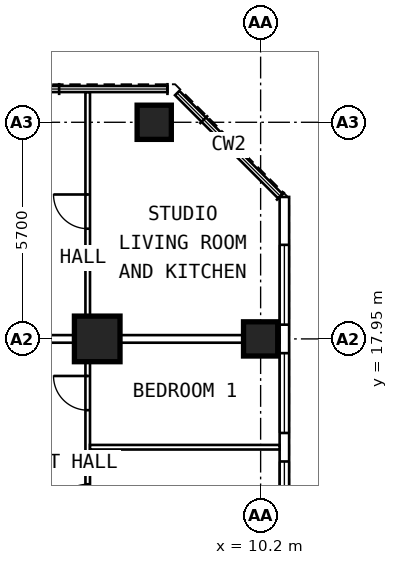
"""IFC4 building model, lengths in metres.
Left out: names, types, materials, properties, quantities, classifications, styles, units other than length and angle.
Written with IfcOpenShell. Run it as: python <this file> out.ifc"""

import sys

from ifc_helpers import new_model, si_unit, direction, frame, frame_2d, origin, origin_2d, place, context, subcontext, project, spatial, rectangle, extrude, element, fill, save


model = new_model("IFC4")
c1 = context("Model", 3, precision=1e-05, world=origin(), true_north=direction((0.0, 1.0)))
c2 = subcontext(c1, "Body", "Model", "MODEL_VIEW")
j1 = project(units=[si_unit("LENGTHUNIT", "METRE"), si_unit("PLANEANGLEUNIT", "RADIAN")], contexts=[c1])
p1 = place(None, origin())
s1 = spatial("IfcSite", under=j1, at=p1, CompositionType="ELEMENT")
p2 = place(p1, origin())
s2 = spatial("IfcBuilding", under=s1, at=p2, CompositionType="ELEMENT")
p3 = place(p2, frame((0.0, 0.0, 165.2)))
s3 = spatial("IfcBuildingStorey", under=s2, at=p3, CompositionType="ELEMENT", Elevation=165.2)
for number, where, z_axis, x_axis in (
    (1, (10.2, 17.95, 0.0), (0.0, 0.0, 1.0), (0.0, 1.0, 0.0)),
    (2, (7.4, 23.65, 0.0), (0.0, 0.0, 1.0), (0.0, 1.0, 0.0)),
):
    element("IfcColumn", number, at=place(p3, frame(where, z_axis=z_axis, x_axis=x_axis)), inside=s3, PredefinedType="COLUMN", context=c2, shape_type="SweptSolid", body=[
        extrude(rectangle(XDim=0.9, YDim=0.9, at=origin_2d()), origin(), (0.0, 0.0, 1.0), 3.6),
    ])
p4 = place(p3, frame((5.9, 17.95, 0.0), z_axis=(0.0, 0.0, 1.0), x_axis=(0.0, 1.0, 0.0)))
e3 = element("IfcColumn", 3, at=p4, inside=s3, PredefinedType="COLUMN", context=c2, shape_type="SweptSolid", body=[
    extrude(rectangle(XDim=1.2, YDim=1.2, at=origin_2d()), origin(), (0.0, 0.0, 1.0), 3.6),
])
p5 = place(p3, frame((10.825, 6.409, 0.0), z_axis=(0.0, 0.0, 1.0), x_axis=(0.0, 1.0, 0.0)))
e4 = element("IfcWall", 4, at=p5, inside=s3, PredefinedType="SOLIDWALL", context=c2, shape_type="SweptSolid", body=[
    extrude(rectangle(XDim=15.276, YDim=0.25, at=frame_2d((7.638, 0.0))), origin(), (0.0, 0.0, 1.0), 3.35),
])
p6 = place(p5, frame((0.516, 0.0, 0.8)))
e5 = element("IfcOpeningElement", 5, at=p6, cuts=e4, PredefinedType="OPENING", context=c2, shape_type="SweptSolid", body=[
    extrude(rectangle(XDim=2.1, YDim=1.8, at=frame_2d((1.05, 0.9))), frame((0.0, 0.137, 0.0), z_axis=(0.0, -1.0, 0.0), x_axis=(1.0, 0.0, 0.0)), (0.0, 0.0, 1.0), 0.274),
])
p7 = place(p5, frame((3.366, 0.0, 0.8)))
e6 = element("IfcOpeningElement", 6, at=p7, cuts=e4, PredefinedType="OPENING", context=c2, shape_type="SweptSolid", body=[
    extrude(rectangle(XDim=2.1, YDim=1.8, at=frame_2d((1.05, 0.9))), frame((0.0, 0.137, 0.0), z_axis=(0.0, -1.0, 0.0), x_axis=(1.0, 0.0, 0.0)), (0.0, 0.0, 1.0), 0.274),
])
p8 = place(p5, frame((6.216, 0.0, 0.8)))
e7 = element("IfcOpeningElement", 7, at=p8, cuts=e4, PredefinedType="OPENING", context=c2, shape_type="SweptSolid", body=[
    extrude(rectangle(XDim=2.1, YDim=1.8, at=frame_2d((1.05, 0.9))), frame((0.0, 0.137, 0.0), z_axis=(0.0, -1.0, 0.0), x_axis=(1.0, 0.0, 0.0)), (0.0, 0.0, 1.0), 0.274),
])
p9 = place(p5, frame((9.066, 0.0, 0.8)))
e8 = element("IfcOpeningElement", 8, at=p9, cuts=e4, PredefinedType="OPENING", context=c2, shape_type="SweptSolid", body=[
    extrude(rectangle(XDim=2.1, YDim=1.8, at=frame_2d((1.05, 0.9))), frame((0.0, 0.137, 0.0), z_axis=(0.0, -1.0, 0.0), x_axis=(1.0, 0.0, 0.0)), (0.0, 0.0, 1.0), 0.274),
])
p10 = place(p5, frame((11.916, 0.0, 0.8)))
e9 = element("IfcOpeningElement", 9, at=p10, cuts=e4, PredefinedType="OPENING", context=c2, shape_type="SweptSolid", body=[
    extrude(rectangle(XDim=2.1, YDim=1.8, at=frame_2d((1.05, 0.9))), frame((0.0, 0.137, 0.0), z_axis=(0.0, -1.0, 0.0), x_axis=(1.0, 0.0, 0.0)), (0.0, 0.0, 1.0), 0.274),
])
p11 = place(p3, frame((5.65, 9.6, 0.0), z_axis=(0.0, 0.0, 1.0), x_axis=(0.0, 1.0, 0.0)))
e10 = element("IfcWall", 10, at=p11, inside=s3, PredefinedType="PARTITIONING", context=c2, shape_type="SweptSolid", body=[
    extrude(rectangle(XDim=8.1, YDim=0.12, at=frame_2d((4.05, 0.0))), origin(), (0.0, 0.0, 1.0), 3.35),
])
p12 = place(p11, frame((1.0, 0.0, 0.0)))
e11 = element("IfcOpeningElement", 11, at=p12, cuts=e10, PredefinedType="OPENING", context=c2, shape_type="SweptSolid", body=[
    extrude(rectangle(XDim=0.9, YDim=2.1, at=frame_2d((0.45, 1.05))), frame((0.0, 0.072, 0.0), z_axis=(0.0, -1.0, 0.0), x_axis=(1.0, 0.0, 0.0)), (0.0, 0.0, 1.0), 0.144),
])
p13 = place(p11, frame((3.625, 0.0, 0.0)))
e12 = element("IfcOpeningElement", 12, at=p13, cuts=e10, PredefinedType="OPENING", context=c2, shape_type="SweptSolid", body=[
    extrude(rectangle(XDim=0.9, YDim=2.1, at=frame_2d((0.45, 1.05))), frame((0.0, 0.072, 0.0), z_axis=(0.0, -1.0, 0.0), x_axis=(1.0, 0.0, 0.0)), (0.0, 0.0, 1.0), 0.144),
])
p14 = place(p11, frame((6.475, 0.0, 0.0)))
e13 = element("IfcOpeningElement", 13, at=p14, cuts=e10, PredefinedType="OPENING", context=c2, shape_type="SweptSolid", body=[
    extrude(rectangle(XDim=0.9, YDim=2.1, at=frame_2d((0.45, 1.05))), frame((0.0, 0.072, 0.0), z_axis=(0.0, -1.0, 0.0), x_axis=(1.0, 0.0, 0.0)), (0.0, 0.0, 1.0), 0.144),
])
p15 = place(p3, frame((5.71, 15.1, 0.0), z_axis=(0.0, 0.0, 1.0), x_axis=(1.0, 0.0, 0.0)))
e14 = element("IfcWall", 14, at=p15, inside=s3, PredefinedType="PARTITIONING", context=c2, shape_type="SweptSolid", body=[
    extrude(rectangle(XDim=4.99, YDim=0.12, at=frame_2d((2.495, 0.0))), origin(), (0.0, 0.0, 1.0), 3.35),
])
p16 = place(p3, frame((5.65, 18.05, 0.0), z_axis=(0.0, 0.0, 1.0), x_axis=(0.0, 1.0, 0.0)))
e15 = element("IfcWall", 15, at=p16, inside=s3, PredefinedType="PARTITIONING", context=c2, shape_type="SweptSolid", body=[
    extrude(rectangle(XDim=6.395, YDim=0.12, at=frame_2d((3.198, 0.0))), origin(), (0.0, 0.0, 1.0), 3.35),
])
p17 = place(p16, frame((2.8, 0.0, 0.0)))
e16 = element("IfcOpeningElement", 16, at=p17, cuts=e15, PredefinedType="OPENING", context=c2, shape_type="SweptSolid", body=[
    extrude(rectangle(XDim=0.9, YDim=2.1, at=frame_2d((0.45, 1.05))), frame((0.0, 0.072, 0.0), z_axis=(0.0, -1.0, 0.0), x_axis=(1.0, 0.0, 0.0)), (0.0, 0.0, 1.0), 0.144),
])
p18 = place(p3, frame((2.0, 17.95, 0.0), z_axis=(0.0, 0.0, 1.0), x_axis=(1.0, 0.0, 0.0)))
e17 = element("IfcWall", 17, at=p18, inside=s3, PredefinedType="PARTITIONING", context=c2, shape_type="SweptSolid", body=[
    extrude(rectangle(XDim=8.7, YDim=0.2, at=frame_2d((4.35, 0.0))), origin(), (0.0, 0.0, 1.0), 2.45),
])
p19 = place(p8, origin())
e18 = element("IfcWindow", 18, at=p19, inside=s3, PartitioningType="SINGLE_PANEL", PredefinedType="WINDOW", context=c2, shape_type="SweptSolid", body=[
    extrude(rectangle(XDim=2.1, YDim=1.8, at=frame_2d((1.05, 0.9))), frame((0.0, 0.03, 0.0), z_axis=(0.0, -1.0, 0.0), x_axis=(1.0, 0.0, 0.0)), (0.0, 0.0, 1.0), 0.06),
])
fill(e7, e18)
p20 = place(p9, origin())
e19 = element("IfcWindow", 19, at=p20, inside=s3, PartitioningType="SINGLE_PANEL", PredefinedType="WINDOW", context=c2, shape_type="SweptSolid", body=[
    extrude(rectangle(XDim=2.1, YDim=1.8, at=frame_2d((1.05, 0.9))), frame((0.0, 0.03, 0.0), z_axis=(0.0, -1.0, 0.0), x_axis=(1.0, 0.0, 0.0)), (0.0, 0.0, 1.0), 0.06),
])
fill(e8, e19)
p21 = place(p10, origin())
e20 = element("IfcWindow", 20, at=p21, inside=s3, PartitioningType="SINGLE_PANEL", PredefinedType="WINDOW", context=c2, shape_type="SweptSolid", body=[
    extrude(rectangle(XDim=2.1, YDim=1.8, at=frame_2d((1.05, 0.9))), frame((0.0, 0.03, 0.0), z_axis=(0.0, -1.0, 0.0), x_axis=(1.0, 0.0, 0.0)), (0.0, 0.0, 1.0), 0.06),
])
fill(e9, e20)
p22 = place(p13, origin())
e21 = element("IfcDoor", 21, at=p22, inside=s3, OperationType="SINGLE_SWING_LEFT", PredefinedType="DOOR", context=c2, shape_type="SweptSolid", body=[
    extrude(rectangle(XDim=0.9, YDim=2.1, at=frame_2d((0.45, 1.05))), frame((0.0, 0.025, 0.0), z_axis=(0.0, -1.0, 0.0), x_axis=(1.0, 0.0, 0.0)), (0.0, 0.0, 1.0), 0.05),
])
fill(e12, e21)
p23 = place(p14, origin())
e22 = element("IfcDoor", 22, at=p23, inside=s3, OperationType="SINGLE_SWING_RIGHT", PredefinedType="DOOR", context=c2, shape_type="SweptSolid", body=[
    extrude(rectangle(XDim=0.9, YDim=2.1, at=frame_2d((0.45, 1.05))), frame((0.0, 0.025, 0.0), z_axis=(0.0, -1.0, 0.0), x_axis=(1.0, 0.0, 0.0)), (0.0, 0.0, 1.0), 0.05),
])
fill(e13, e22)
p24 = place(p17, origin())
e23 = element("IfcDoor", 23, at=p24, inside=s3, OperationType="SINGLE_SWING_RIGHT", PredefinedType="DOOR", context=c2, shape_type="SweptSolid", body=[
    extrude(rectangle(XDim=0.9, YDim=2.1, at=frame_2d((0.45, 1.05))), frame((0.0, 0.025, 0.0), z_axis=(0.0, -1.0, 0.0), x_axis=(1.0, 0.0, 0.0)), (0.0, 0.0, 1.0), 0.05),
])
fill(e16, e23)
save(model, sys.argv[1])
